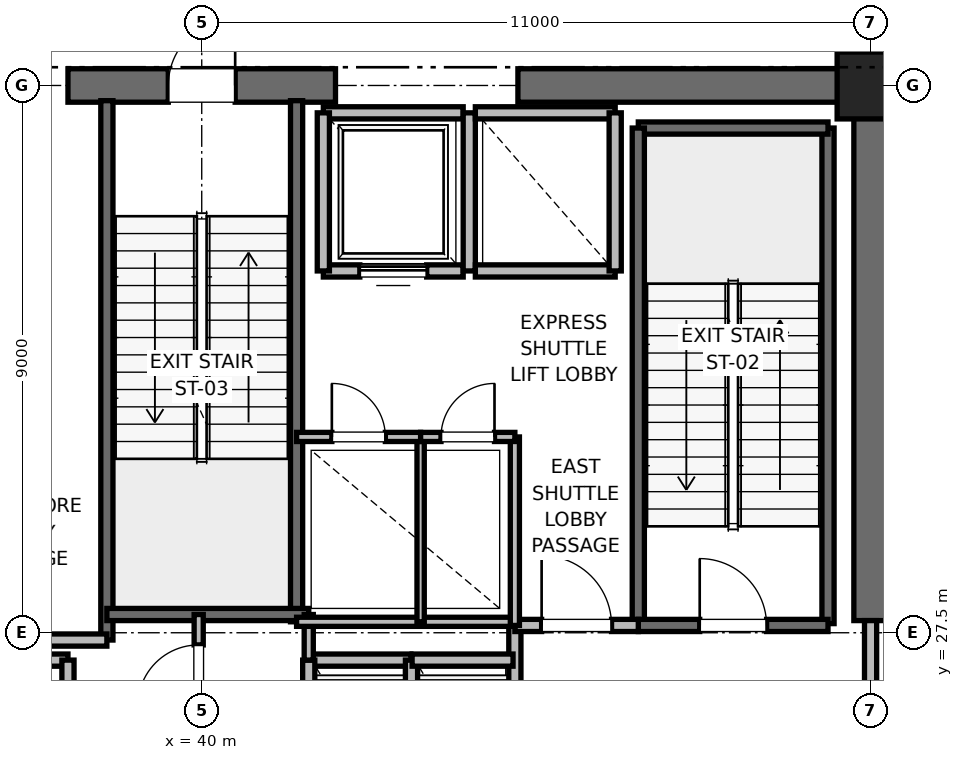
"""IFC4 building model, lengths in metres.
Left out: names, types, materials, properties, quantities, classifications, styles, units other than length and angle.
Written with IfcOpenShell. Run it as: python <this file> out.ifc"""

import sys

from ifc_helpers import new_model, si_unit, direction, frame, frame_2d, origin, origin_2d, place, context, subcontext, project, spatial, rectangle, extrude, element, fill, save


model = new_model("IFC4")
c1 = context("Model", 3, precision=1e-05, world=origin(), true_north=direction((0.0, 1.0)))
c2 = subcontext(c1, "Body", "Model", "MODEL_VIEW")
j1 = project(units=[si_unit("LENGTHUNIT", "METRE"), si_unit("PLANEANGLEUNIT", "RADIAN")], contexts=[c1])
p1 = place(None, origin())
s1 = spatial("IfcSite", under=j1, at=p1, CompositionType="ELEMENT")
p2 = place(p1, origin())
s2 = spatial("IfcBuilding", under=s1, at=p2, CompositionType="ELEMENT")
p3 = place(p2, frame((0.0, 0.0, 123.4)))
s3 = spatial("IfcBuildingStorey", under=s2, at=p3, CompositionType="ELEMENT", Elevation=123.4)
p4 = place(p3, frame((51.0, 36.5, 0.0), z_axis=(0.0, 0.0, 1.0), x_axis=(1.0, 0.0, 0.0)))
e1 = element("IfcColumn", 1, at=p4, inside=s3, PredefinedType="PILASTER", context=c2, shape_type="SweptSolid", body=[
    extrude(rectangle(XDim=1.1, YDim=1.1, at=origin_2d()), origin(), (0.0, 0.0, 1.0), 5.0),
])
p5 = place(p3, frame((37.8, 36.5, 0.0), z_axis=(0.0, 0.0, 1.0), x_axis=(1.0, 0.0, 0.0)))
e2 = element("IfcWall", 2, at=p5, inside=s3, PredefinedType="SHEAR", context=c2, shape_type="SweptSolid", body=[
    extrude(rectangle(XDim=4.4, YDim=0.55, at=frame_2d((2.2, 0.0))), origin(), (0.0, 0.0, 1.0), 4.775),
])
p6 = place(p5, frame((1.65, 0.0, 0.0)))
e3 = element("IfcOpeningElement", 3, at=p6, cuts=e2, PredefinedType="OPENING", context=c2, shape_type="SweptSolid", body=[
    extrude(rectangle(XDim=1.1, YDim=2.15, at=frame_2d((0.55, 1.075))), frame((0.0, 0.275, 0.0), z_axis=(0.0, -1.0, 0.0), x_axis=(1.0, 0.0, 0.0)), (0.0, 0.0, 1.0), 0.55),
])
p7 = place(p3, frame((45.2, 36.5, 0.0), z_axis=(0.0, 0.0, 1.0), x_axis=(1.0, 0.0, 0.0)))
e4 = element("IfcWall", 4, at=p7, inside=s3, PredefinedType="SHEAR", context=c2, shape_type="SweptSolid", body=[
    extrude(rectangle(XDim=5.8, YDim=0.55, at=frame_2d((2.9, 0.0))), origin(), (0.0, 0.0, 1.0), 4.775),
])
p8 = place(p3, frame((51.0, 27.7, 0.0), z_axis=(0.0, 0.0, 1.0), x_axis=(0.0, 1.0, 0.0)))
e5 = element("IfcWall", 5, at=p8, inside=s3, PredefinedType="SHEAR", context=c2, shape_type="SweptSolid", body=[
    extrude(rectangle(XDim=8.8, YDim=0.55, at=frame_2d((4.4, 0.0))), origin(), (0.0, 0.0, 1.0), 4.775),
])
p9 = place(p3, frame((50.3, 27.65, 0.0), z_axis=(0.0, 0.0, 1.0), x_axis=(0.0, 1.0, 0.0)))
e6 = element("IfcWall", 6, at=p9, inside=s3, PredefinedType="SOLIDWALL", context=c2, shape_type="SweptSolid", body=[
    extrude(rectangle(XDim=8.15, YDim=0.2, at=frame_2d((4.075, 0.0))), origin(), (0.0, 0.0, 1.0), 4.775),
])
p10 = place(p3, frame((47.18, 35.8, 0.0), z_axis=(0.0, 0.0, 1.0), x_axis=(1.0, 0.0, 0.0)))
e7 = element("IfcWall", 7, at=p10, inside=s3, PredefinedType="SOLIDWALL", context=c2, shape_type="SweptSolid", body=[
    extrude(rectangle(XDim=3.12, YDim=0.2, at=frame_2d((1.56, 0.0))), origin(), (0.0, 0.0, 1.0), 4.775),
])
p11 = place(p3, frame((47.18, 27.62, 0.0), z_axis=(0.0, 0.0, 1.0), x_axis=(0.0, 1.0, 0.0)))
e8 = element("IfcWall", 8, at=p11, inside=s3, PredefinedType="SOLIDWALL", context=c2, shape_type="SweptSolid", body=[
    extrude(rectangle(XDim=8.18, YDim=0.2, at=frame_2d((4.09, 0.0))), origin(), (0.0, 0.0, 1.0), 4.775),
])
p12 = place(p3, frame((47.18, 27.62, 0.0), z_axis=(0.0, 0.0, 1.0), x_axis=(1.0, 0.0, 0.0)))
e9 = element("IfcWall", 9, at=p12, inside=s3, PredefinedType="SOLIDWALL", context=c2, shape_type="SweptSolid", body=[
    extrude(rectangle(XDim=3.12, YDim=0.2, at=frame_2d((1.56, 0.0))), origin(), (0.0, 0.0, 1.0), 4.775),
])
p13 = place(p12, frame((1.01, 0.0, 0.0)))
e10 = element("IfcOpeningElement", 10, at=p13, cuts=e9, PredefinedType="OPENING", context=c2, shape_type="SweptSolid", body=[
    extrude(rectangle(XDim=1.1, YDim=2.15, at=frame_2d((0.55, 1.075))), frame((0.0, 0.1, 0.0), z_axis=(0.0, -1.0, 0.0), x_axis=(1.0, 0.0, 0.0)), (0.0, 0.0, 1.0), 0.2),
])
p14 = place(p3, frame((38.44, 27.38, 0.0), z_axis=(0.0, 0.0, 1.0), x_axis=(0.0, 1.0, 0.0)))
e11 = element("IfcWall", 11, at=p14, inside=s3, PredefinedType="SOLIDWALL", context=c2, shape_type="SweptSolid", body=[
    extrude(rectangle(XDim=8.87, YDim=0.2, at=frame_2d((4.435, 0.0))), origin(), (0.0, 0.0, 1.0), 4.775),
])
p15 = place(p3, frame((41.56, 27.68, 0.0), z_axis=(0.0, 0.0, 1.0), x_axis=(0.0, 1.0, 0.0)))
e12 = element("IfcWall", 12, at=p15, inside=s3, PredefinedType="SOLIDWALL", context=c2, shape_type="SweptSolid", body=[
    extrude(rectangle(XDim=8.57, YDim=0.2, at=frame_2d((4.285, 0.0))), origin(), (0.0, 0.0, 1.0), 4.775),
])
p16 = place(p3, frame((38.44, 27.8, 0.0), z_axis=(0.0, 0.0, 1.0), x_axis=(1.0, 0.0, 0.0)))
e13 = element("IfcWall", 13, at=p16, inside=s3, PredefinedType="SOLIDWALL", context=c2, shape_type="SweptSolid", body=[
    extrude(rectangle(XDim=3.32, YDim=0.2, at=frame_2d((1.66, 0.0))), origin(), (0.0, 0.0, 1.0), 4.775),
])
p17 = place(p3, frame((32.82, 27.38, 0.0), z_axis=(0.0, 0.0, 1.0), x_axis=(1.0, 0.0, 0.0)))
e14 = element("IfcWall", 14, at=p17, inside=s3, PredefinedType="PARTITIONING", context=c2, shape_type="SweptSolid", body=[
    extrude(rectangle(XDim=5.62, YDim=0.2, at=frame_2d((2.81, 0.0))), origin(), (0.0, 0.0, 1.0), 4.775),
])
p18 = place(p3, frame((45.15, 24.25, 0.0), z_axis=(0.0, 0.0, 1.0), x_axis=(0.0, 1.0, 0.0)))
e15 = element("IfcWall", 15, at=p18, inside=s3, PredefinedType="PARTITIONING", context=c2, shape_type="SweptSolid", body=[
    extrude(rectangle(XDim=3.37, YDim=0.2, at=frame_2d((1.685, 0.0))), origin(), (0.0, 0.0, 1.0), 4.775),
])
p19 = place(p3, frame((45.15, 27.62, 0.0), z_axis=(0.0, 0.0, 1.0), x_axis=(1.0, 0.0, 0.0)))
e16 = element("IfcWall", 16, at=p19, inside=s3, PredefinedType="PARTITIONING", context=c2, shape_type="SweptSolid", body=[
    extrude(rectangle(XDim=2.03, YDim=0.2, at=frame_2d((1.015, 0.0))), origin(), (0.0, 0.0, 1.0), 4.775),
])
p20 = place(p19, frame((0.44, 0.0, 0.0)))
e17 = element("IfcOpeningElement", 17, at=p20, cuts=e16, PredefinedType="OPENING", context=c2, shape_type="SweptSolid", body=[
    extrude(rectangle(XDim=1.15, YDim=2.2, at=frame_2d((0.575, 1.1))), frame((0.0, 0.1, 0.0), z_axis=(0.0, -1.0, 0.0), x_axis=(1.0, 0.0, 0.0)), (0.0, 0.0, 1.0), 0.2),
])
p21 = place(p3, frame((51.0, 24.3, 0.0), z_axis=(0.0, 0.0, 1.0), x_axis=(0.0, 1.0, 0.0)))
e18 = element("IfcWall", 18, at=p21, inside=s3, PredefinedType="PARTITIONING", context=c2, shape_type="SweptSolid", body=[
    extrude(rectangle(XDim=3.4, YDim=0.2, at=frame_2d((1.7, 0.0))), origin(), (0.0, 0.0, 1.0), 3.755),
])
p22 = place(p21, frame((1.125, 0.0, 0.0)))
e19 = element("IfcOpeningElement", 19, at=p22, cuts=e18, PredefinedType="OPENING", context=c2, shape_type="SweptSolid", body=[
    extrude(rectangle(XDim=1.15, YDim=2.2, at=frame_2d((0.575, 1.1))), frame((0.0, 0.1, 0.0), z_axis=(0.0, -1.0, 0.0), x_axis=(1.0, 0.0, 0.0)), (0.0, 0.0, 1.0), 0.2),
])
p23 = place(p3, frame((37.8, 27.05, 0.0), z_axis=(0.0, 0.0, 1.0), x_axis=(-1.0, 0.0, 0.0)))
e20 = element("IfcWall", 20, at=p23, inside=s3, PredefinedType="SOLIDWALL", context=c2, shape_type="SweptSolid", body=[
    extrude(rectangle(XDim=2.3, YDim=0.2, at=frame_2d((1.15, 0.0))), origin(), (0.0, 0.0, 1.0), 4.775),
])
p24 = place(p3, frame((37.8, 24.45, 0.0), z_axis=(0.0, 0.0, 1.0), x_axis=(0.0, 1.0, 0.0)))
e21 = element("IfcWall", 21, at=p24, inside=s3, PredefinedType="SOLIDWALL", context=c2, shape_type="SweptSolid", body=[
    extrude(rectangle(XDim=2.6, YDim=0.2, at=frame_2d((1.3, 0.0))), origin(), (0.0, 0.0, 1.0), 4.775),
])
p25 = place(p3, frame((43.44, 27.05, 0.0), z_axis=(0.0, 0.0, 1.0), x_axis=(-1.0, 0.0, 0.0)))
e22 = element("IfcWall", 22, at=p25, inside=s3, PredefinedType="SOLIDWALL", context=c2, shape_type="SweptSolid", body=[
    extrude(rectangle(XDim=1.68, YDim=0.2, at=frame_2d((0.84, 0.0))), origin(), (0.0, 0.0, 1.0), 4.775),
])
for number, where, z_axis, x_axis in (
    (23, (41.76, 27.05, 0.0), (0.0, 0.0, 1.0), (0.0, -1.0, 0.0)),
    (24, (43.45, 24.45, 0.0), (0.0, 0.0, 1.0), (0.0, 1.0, 0.0)),
):
    element("IfcWall", number, at=place(p3, frame(where, z_axis=z_axis, x_axis=x_axis)), inside=s3, PredefinedType="SOLIDWALL", context=c2, shape_type="SweptSolid", body=[
        extrude(rectangle(XDim=2.6, YDim=0.2, at=frame_2d((1.3, 0.0))), origin(), (0.0, 0.0, 1.0), 4.775),
    ])
p26 = place(p3, frame((45.12, 27.05, 0.0), z_axis=(0.0, 0.0, 1.0), x_axis=(-1.0, 0.0, 0.0)))
e25 = element("IfcWall", 25, at=p26, inside=s3, PredefinedType="SOLIDWALL", context=c2, shape_type="SweptSolid", body=[
    extrude(rectangle(XDim=1.66, YDim=0.2, at=frame_2d((0.83, 0.0))), origin(), (0.0, 0.0, 1.0), 4.775),
])
p27 = place(p3, frame((42.0, 33.45, 0.0), z_axis=(0.0, 0.0, 1.0), x_axis=(1.0, 0.0, 0.0)))
e26 = element("IfcWall", 26, at=p27, inside=s3, PredefinedType="SOLIDWALL", context=c2, shape_type="SweptSolid", body=[
    extrude(rectangle(XDim=2.3, YDim=0.2, at=frame_2d((1.15, 0.0))), origin(), (0.0, 0.0, 1.0), 4.775),
])
p28 = place(p27, frame((0.6, 0.0, 0.0)))
e27 = element("IfcOpeningElement", 27, at=p28, cuts=e26, PredefinedType="OPENING", context=c2, shape_type="SweptSolid", body=[
    extrude(rectangle(XDim=1.1, YDim=2.2, at=frame_2d((0.55, 1.1))), frame((0.0, 0.1, 0.0), z_axis=(0.0, -1.0, 0.0), x_axis=(1.0, 0.0, 0.0)), (0.0, 0.0, 1.0), 0.2),
])
p29 = place(p3, frame((44.3, 36.05, 0.0), z_axis=(0.0, 0.0, 1.0), x_axis=(-1.0, 0.0, 0.0)))
e28 = element("IfcWall", 28, at=p29, inside=s3, PredefinedType="SOLIDWALL", context=c2, shape_type="SweptSolid", body=[
    extrude(rectangle(XDim=2.3, YDim=0.2, at=frame_2d((1.15, 0.0))), origin(), (0.0, 0.0, 1.0), 3.755),
])
for number, where, z_axis, x_axis in (
    (29, (42.0, 36.05, 0.0), (0.0, 0.0, 1.0), (0.0, -1.0, 0.0)),
    (30, (44.4, 33.45, 0.0), (0.0, 0.0, 1.0), (0.0, 1.0, 0.0)),
):
    element("IfcWall", number, at=place(p3, frame(where, z_axis=z_axis, x_axis=x_axis)), inside=s3, PredefinedType="SOLIDWALL", context=c2, shape_type="SweptSolid", body=[
        extrude(rectangle(XDim=2.6, YDim=0.2, at=frame_2d((1.3, 0.0))), origin(), (0.0, 0.0, 1.0), 3.755),
    ])
p30 = place(p3, frame((44.5, 33.45, 0.0), z_axis=(0.0, 0.0, 1.0), x_axis=(1.0, 0.0, 0.0)))
e31 = element("IfcWall", 31, at=p30, inside=s3, PredefinedType="SOLIDWALL", context=c2, shape_type="SweptSolid", body=[
    extrude(rectangle(XDim=2.3, YDim=0.2, at=frame_2d((1.15, 0.0))), origin(), (0.0, 0.0, 1.0), 4.775),
])
p31 = place(p3, frame((46.8, 36.05, 0.0), z_axis=(0.0, 0.0, 1.0), x_axis=(-1.0, 0.0, 0.0)))
e32 = element("IfcWall", 32, at=p31, inside=s3, PredefinedType="SOLIDWALL", context=c2, shape_type="SweptSolid", body=[
    extrude(rectangle(XDim=2.3, YDim=0.2, at=frame_2d((1.15, 0.0))), origin(), (0.0, 0.0, 1.0), 3.755),
])
p32 = place(p3, frame((46.8, 33.45, 0.0), z_axis=(0.0, 0.0, 1.0), x_axis=(0.0, 1.0, 0.0)))
e33 = element("IfcWall", 33, at=p32, inside=s3, PredefinedType="SOLIDWALL", context=c2, shape_type="SweptSolid", body=[
    extrude(rectangle(XDim=2.6, YDim=0.2, at=frame_2d((1.3, 0.0))), origin(), (0.0, 0.0, 1.0), 4.775),
])
p33 = place(p3, frame((41.76, 27.05, 0.0), z_axis=(0.0, 0.0, 1.0), x_axis=(0.0, 1.0, 0.0)))
e34 = element("IfcWall", 34, at=p33, inside=s3, PredefinedType="PARTITIONING", context=c2, shape_type="SweptSolid", body=[
    extrude(rectangle(XDim=0.75, YDim=0.15, at=frame_2d((0.375, 0.0))), origin(), (0.0, 0.0, 1.0), 2.85),
])
p34 = place(p3, frame((39.95, 25.8, 0.0), z_axis=(0.0, 0.0, 1.0), x_axis=(0.0, 1.0, 0.0)))
e35 = element("IfcWall", 35, at=p34, inside=s3, PredefinedType="PARTITIONING", context=c2, shape_type="SweptSolid", body=[
    extrude(rectangle(XDim=2.0, YDim=0.15, at=frame_2d((1.0, 0.0))), origin(), (0.0, 0.0, 1.0), 2.85),
])
p35 = place(p34, frame((0.5, 0.0, 0.0)))
e36 = element("IfcOpeningElement", 36, at=p35, cuts=e35, PredefinedType="OPENING", context=c2, shape_type="SweptSolid", body=[
    extrude(rectangle(XDim=1.0, YDim=2.15, at=frame_2d((0.5, 1.075))), frame((0.0, 0.075, 0.0), z_axis=(0.0, -1.0, 0.0), x_axis=(1.0, 0.0, 0.0)), (0.0, 0.0, 1.0), 0.15),
])
p36 = place(p3, frame((41.56, 27.68, 0.0), z_axis=(0.0, 0.0, 1.0), x_axis=(1.0, 0.0, 0.0)))
e37 = element("IfcWall", 37, at=p36, inside=s3, PredefinedType="PARTITIONING", context=c2, shape_type="SweptSolid", body=[
    extrude(rectangle(XDim=3.59, YDim=0.15, at=frame_2d((1.795, 0.0))), origin(), (0.0, 0.0, 1.0), 2.85),
])
p37 = place(p3, frame((45.15, 27.62, 0.0), z_axis=(0.0, 0.0, 1.0), x_axis=(0.0, 1.0, 0.0)))
e38 = element("IfcWall", 38, at=p37, inside=s3, PredefinedType="PARTITIONING", context=c2, shape_type="SweptSolid", body=[
    extrude(rectangle(XDim=3.1, YDim=0.15, at=frame_2d((1.55, 0.0))), origin(), (0.0, 0.0, 1.0), 2.85),
])
p38 = place(p3, frame((43.6, 27.68, 0.0), z_axis=(0.0, 0.0, 1.0), x_axis=(0.0, 1.0, 0.0)))
e39 = element("IfcWall", 39, at=p38, inside=s3, PredefinedType="PARTITIONING", context=c2, shape_type="SweptSolid", body=[
    extrude(rectangle(XDim=3.04, YDim=0.12, at=frame_2d((1.52, 0.0))), origin(), (0.0, 0.0, 1.0), 2.85),
])
p39 = place(p3, frame((41.56, 30.72, 0.0), z_axis=(0.0, 0.0, 1.0), x_axis=(1.0, 0.0, 0.0)))
e40 = element("IfcWall", 40, at=p39, inside=s3, PredefinedType="PARTITIONING", context=c2, shape_type="SweptSolid", body=[
    extrude(rectangle(XDim=2.04, YDim=0.15, at=frame_2d((1.02, 0.0))), origin(), (0.0, 0.0, 1.0), 2.85),
])
p40 = place(p39, frame((0.58, 0.0, 0.0)))
e41 = element("IfcOpeningElement", 41, at=p40, cuts=e40, PredefinedType="OPENING", context=c2, shape_type="SweptSolid", body=[
    extrude(rectangle(XDim=0.88, YDim=2.1, at=frame_2d((0.44, 1.05))), frame((0.0, 0.075, 0.0), z_axis=(0.0, -1.0, 0.0), x_axis=(1.0, 0.0, 0.0)), (0.0, 0.0, 1.0), 0.15),
])
p41 = place(p3, frame((43.6, 30.72, 0.0), z_axis=(0.0, 0.0, 1.0), x_axis=(1.0, 0.0, 0.0)))
e42 = element("IfcWall", 42, at=p41, inside=s3, PredefinedType="PARTITIONING", context=c2, shape_type="SweptSolid", body=[
    extrude(rectangle(XDim=1.55, YDim=0.15, at=frame_2d((0.775, 0.0))), origin(), (0.0, 0.0, 1.0), 2.85),
])
p42 = place(p41, frame((0.335, 0.0, 0.0)))
e43 = element("IfcOpeningElement", 43, at=p42, cuts=e42, PredefinedType="OPENING", context=c2, shape_type="SweptSolid", body=[
    extrude(rectangle(XDim=0.88, YDim=2.1, at=frame_2d((0.44, 1.05))), frame((0.0, 0.075, 0.0), z_axis=(0.0, -1.0, 0.0), x_axis=(1.0, 0.0, 0.0)), (0.0, 0.0, 1.0), 0.15),
])
p43 = place(p13, origin())
e44 = element("IfcDoor", 44, at=p43, inside=s3, OperationType="SINGLE_SWING_LEFT", PredefinedType="DOOR", context=c2, shape_type="SweptSolid", body=[
    extrude(rectangle(XDim=1.1, YDim=2.15, at=frame_2d((0.55, 1.075))), frame((0.0, 0.025, 0.0), z_axis=(0.0, -1.0, 0.0), x_axis=(1.0, 0.0, 0.0)), (0.0, 0.0, 1.0), 0.05),
])
fill(e10, e44)
p44 = place(p6, origin())
e45 = element("IfcDoor", 45, at=p44, inside=s3, OperationType="SINGLE_SWING_RIGHT", PredefinedType="DOOR", context=c2, shape_type="SweptSolid", body=[
    extrude(rectangle(XDim=1.1, YDim=2.15, at=frame_2d((0.55, 1.075))), frame((0.0, 0.025, 0.0), z_axis=(0.0, -1.0, 0.0), x_axis=(1.0, 0.0, 0.0)), (0.0, 0.0, 1.0), 0.05),
])
fill(e3, e45)
p45 = place(p20, origin())
e46 = element("IfcDoor", 46, at=p45, inside=s3, OperationType="SINGLE_SWING_LEFT", PredefinedType="DOOR", context=c2, shape_type="SweptSolid", body=[
    extrude(rectangle(XDim=1.15, YDim=2.2, at=frame_2d((0.575, 1.1))), frame((0.0, 0.025, 0.0), z_axis=(0.0, -1.0, 0.0), x_axis=(1.0, 0.0, 0.0)), (0.0, 0.0, 1.0), 0.05),
])
fill(e17, e46)
p46 = place(p28, origin())
e47 = element("IfcDoor", 47, at=p46, inside=s3, OperationType="SLIDING_TO_RIGHT", PredefinedType="DOOR", context=c2, shape_type="SweptSolid", body=[
    extrude(rectangle(XDim=1.1, YDim=2.2, at=frame_2d((0.55, 1.1))), frame((0.0, 0.025, 0.0), z_axis=(0.0, -1.0, 0.0), x_axis=(1.0, 0.0, 0.0)), (0.0, 0.0, 1.0), 0.05),
])
fill(e27, e47)
p47 = place(p35, origin())
e48 = element("IfcDoor", 48, at=p47, inside=s3, OperationType="SINGLE_SWING_LEFT", PredefinedType="DOOR", context=c2, shape_type="SweptSolid", body=[
    extrude(rectangle(XDim=1.0, YDim=2.15, at=frame_2d((0.5, 1.075))), frame((0.0, 0.025, 0.0), z_axis=(0.0, -1.0, 0.0), x_axis=(1.0, 0.0, 0.0)), (0.0, 0.0, 1.0), 0.05),
])
fill(e36, e48)
p48 = place(p40, origin())
e49 = element("IfcDoor", 49, at=p48, inside=s3, OperationType="SINGLE_SWING_LEFT", PredefinedType="DOOR", context=c2, shape_type="SweptSolid", body=[
    extrude(rectangle(XDim=0.88, YDim=2.1, at=frame_2d((0.44, 1.05))), frame((0.0, 0.025, 0.0), z_axis=(0.0, -1.0, 0.0), x_axis=(1.0, 0.0, 0.0)), (0.0, 0.0, 1.0), 0.05),
])
fill(e41, e49)
p49 = place(p42, origin())
e50 = element("IfcDoor", 50, at=p49, inside=s3, OperationType="SINGLE_SWING_RIGHT", PredefinedType="DOOR", context=c2, shape_type="SweptSolid", body=[
    extrude(rectangle(XDim=0.88, YDim=2.1, at=frame_2d((0.44, 1.05))), frame((0.0, 0.025, 0.0), z_axis=(0.0, -1.0, 0.0), x_axis=(1.0, 0.0, 0.0)), (0.0, 0.0, 1.0), 0.05),
])
fill(e43, e50)
save(model, sys.argv[1])
